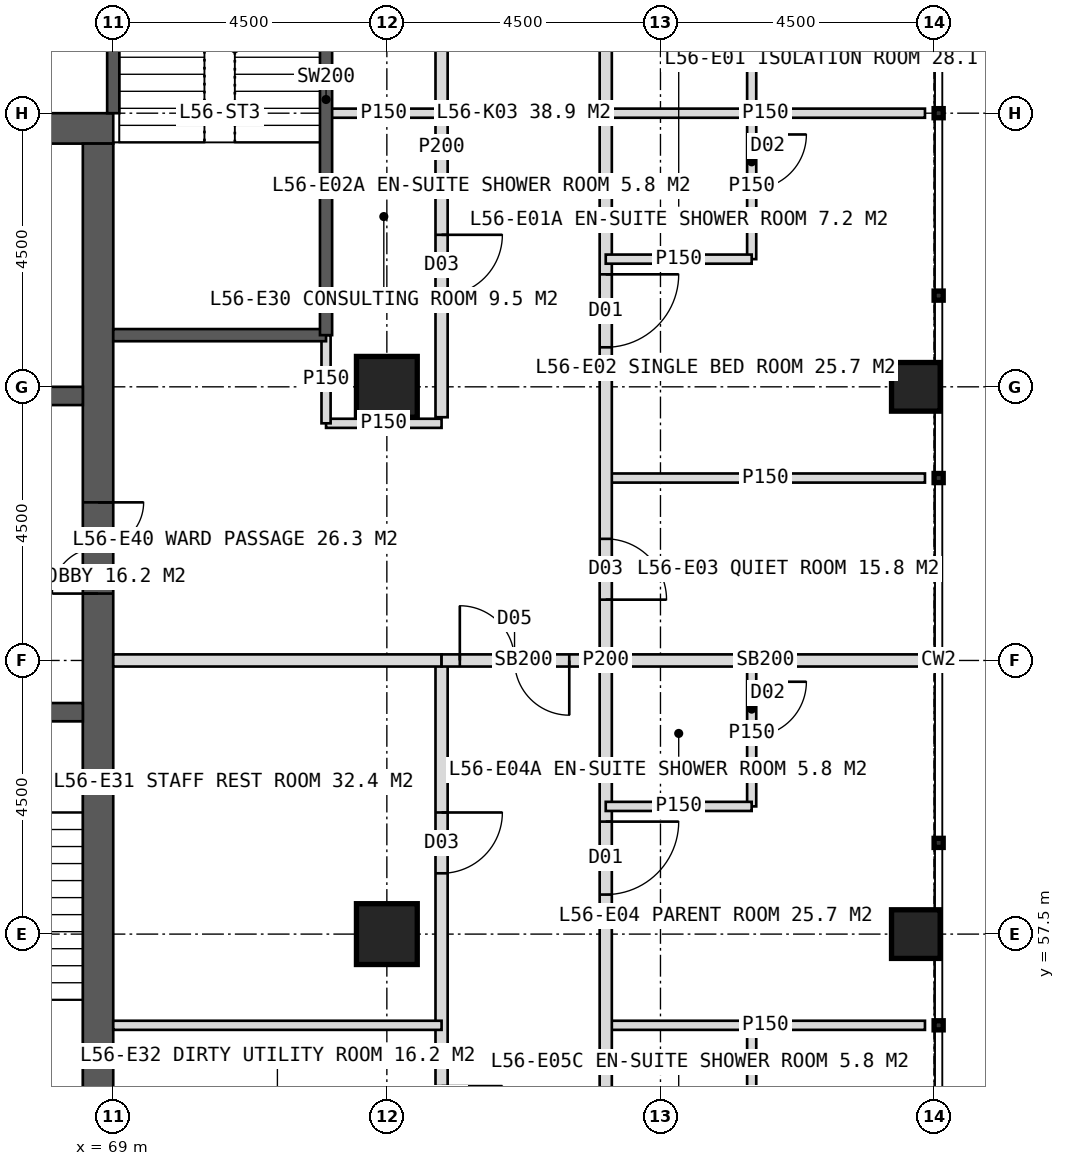
"""IFC4 building model, lengths in metres.
Left out: names, types, materials, properties, quantities, classifications, styles, units other than length and angle.
Written with IfcOpenShell. Run it as: python <this file> out.ifc"""

import sys

from ifc_helpers import new_model, si_unit, direction, frame, frame_2d, origin, origin_2d, place, context, subcontext, project, spatial, rectangle, hollow_rectangle, extrude, element, fill, save


model = new_model("IFC4")
c1 = context("Model", 3, precision=1e-05, world=origin(), true_north=direction((0.0, 1.0)))
c2 = subcontext(c1, "Body", "Model", "MODEL_VIEW")
j1 = project(units=[si_unit("LENGTHUNIT", "METRE"), si_unit("PLANEANGLEUNIT", "RADIAN")], contexts=[c1])
p1 = place(None, origin())
s1 = spatial("IfcSite", under=j1, at=p1, CompositionType="ELEMENT")
p2 = place(p1, origin())
s2 = spatial("IfcBuilding", under=s1, at=p2, CompositionType="ELEMENT")
p3 = place(p2, frame((0.0, 0.0, 233.0)))
s3 = spatial("IfcBuildingStorey", under=s2, at=p3, CompositionType="ELEMENT", Elevation=233.0)
p4 = place(p3, frame((51.0, 70.75, 0.0), z_axis=(0.0, 0.0, 1.0), x_axis=(1.0, 0.0, 0.0)))
e1 = element("IfcWall", 1, at=p4, inside=s3, PredefinedType="SHEAR", context=c2, shape_type="SweptSolid", body=[
    extrude(rectangle(XDim=18.0, YDim=0.5, at=frame_2d((9.0, 0.0))), origin(), (0.0, 0.0, 1.0), 4.0),
])
p5 = place(p4, frame((8.1, 0.0, 0.0)))
e2 = element("IfcOpeningElement", 2, at=p5, cuts=e1, PredefinedType="OPENING", context=c2, shape_type="SweptSolid", body=[
    extrude(rectangle(XDim=1.8, YDim=2.2, at=frame_2d((0.9, 1.1))), frame((0.0, 0.26, 0.0), z_axis=(0.0, -1.0, 0.0), x_axis=(1.0, 0.0, 0.0)), (0.0, 0.0, 1.0), 0.52),
])
p6 = place(p3, frame((68.75, 53.5, 0.0), z_axis=(0.0, 0.0, 1.0), x_axis=(0.0, 1.0, 0.0)))
e3 = element("IfcWall", 3, at=p6, inside=s3, PredefinedType="SHEAR", context=c2, shape_type="SweptSolid", body=[
    extrude(rectangle(XDim=17.0, YDim=0.5, at=frame_2d((8.5, 0.0))), origin(), (0.0, 0.0, 1.0), 4.0),
])
p7 = place(p6, frame((9.6, 0.0, 0.0)))
e4 = element("IfcOpeningElement", 4, at=p7, cuts=e3, PredefinedType="OPENING", context=c2, shape_type="SweptSolid", body=[
    extrude(rectangle(XDim=1.5, YDim=2.2, at=frame_2d((0.75, 1.1))), frame((0.0, 0.26, 0.0), z_axis=(0.0, -1.0, 0.0), x_axis=(1.0, 0.0, 0.0)), (0.0, 0.0, 1.0), 0.52),
])
p8 = place(p3, frame((65.2, 61.15, 0.0), z_axis=(0.0, 0.0, 1.0), x_axis=(1.0, 0.0, 0.0)))
e5 = element("IfcWall", 5, at=p8, inside=s3, PredefinedType="SHEAR", context=c2, shape_type="SweptSolid", body=[
    extrude(rectangle(XDim=3.3, YDim=0.3, at=frame_2d((1.65, 0.0))), origin(), (0.0, 0.0, 1.0), 4.0),
])
p9 = place(p8, frame((1.05, 0.0, 0.0)))
e6 = element("IfcOpeningElement", 6, at=p9, cuts=e5, PredefinedType="OPENING", context=c2, shape_type="SweptSolid", body=[
    extrude(rectangle(XDim=1.2, YDim=2.1, at=frame_2d((0.6, 1.05))), frame((0.0, 0.16, 0.0), z_axis=(0.0, -1.0, 0.0), x_axis=(1.0, 0.0, 0.0)), (0.0, 0.0, 1.0), 0.32),
])
p10 = place(p3, frame((65.2, 66.35, 0.0), z_axis=(0.0, 0.0, 1.0), x_axis=(1.0, 0.0, 0.0)))
e7 = element("IfcWall", 7, at=p10, inside=s3, PredefinedType="SHEAR", context=c2, shape_type="SweptSolid", body=[
    extrude(rectangle(XDim=3.3, YDim=0.3, at=frame_2d((1.65, 0.0))), origin(), (0.0, 0.0, 1.0), 4.0),
])
p11 = place(p10, frame((1.05, 0.0, 0.0)))
e8 = element("IfcOpeningElement", 8, at=p11, cuts=e7, PredefinedType="OPENING", context=c2, shape_type="SweptSolid", body=[
    extrude(rectangle(XDim=1.2, YDim=2.2, at=frame_2d((0.6, 1.1))), frame((0.0, 0.16, 0.0), z_axis=(0.0, -1.0, 0.0), x_axis=(1.0, 0.0, 0.0)), (0.0, 0.0, 1.0), 0.32),
])
for number, where, z_axis, x_axis in (
    (9, (73.5, 57.5, 0.0), (0.0, 0.0, 1.0), (1.0, 0.0, 0.0)),
    (10, (73.5, 66.5, 0.0), (0.0, 0.0, 1.0), (1.0, 0.0, 0.0)),
):
    element("IfcColumn", number, at=place(p3, frame(where, z_axis=z_axis, x_axis=x_axis)), inside=s3, PredefinedType="COLUMN", context=c2, shape_type="SweptSolid", body=[
        extrude(hollow_rectangle(XDim=1.0, YDim=1.0, WallThickness=0.1, at=origin_2d()), origin(), (0.0, 0.0, 1.0), 4.0),
    ])
for number, where, z_axis, x_axis in (
    (11, (82.2, 57.5, 0.0), (0.0, 0.0, 1.0), (1.0, 0.0, 0.0)),
    (12, (82.2, 66.5, 0.0), (0.0, 0.0, 1.0), (1.0, 0.0, 0.0)),
):
    element("IfcColumn", number, at=place(p3, frame(where, z_axis=z_axis, x_axis=x_axis)), inside=s3, PredefinedType="COLUMN", context=c2, shape_type="SweptSolid", body=[
        extrude(hollow_rectangle(XDim=0.8, YDim=0.8, WallThickness=0.08, at=origin_2d()), origin(), (0.0, 0.0, 1.0), 4.0),
    ])
for number, where, z_axis, x_axis in (
    (13, (77.1, 71.0, 0.0), (0.0, 0.0, 1.0), (1.0, 0.0, 0.0)),
    (14, (77.1, 65.0, 0.0), (0.0, 0.0, 1.0), (1.0, 0.0, 0.0)),
):
    element("IfcWall", number, at=place(p3, frame(where, z_axis=z_axis, x_axis=x_axis)), inside=s3, PredefinedType="PARTITIONING", context=c2, shape_type="SweptSolid", body=[
        extrude(rectangle(XDim=5.25, YDim=0.15, at=frame_2d((2.625, 0.0))), origin(), (0.0, 0.0, 1.0), 3.75),
    ])
p12 = place(p3, frame((77.1, 62.0, 0.0), z_axis=(0.0, 0.0, 1.0), x_axis=(1.0, 0.0, 0.0)))
e15 = element("IfcWall", 15, at=p12, inside=s3, PredefinedType="SOLIDWALL", context=c2, shape_type="SweptSolid", body=[
    extrude(rectangle(XDim=5.25, YDim=0.2, at=frame_2d((2.625, 0.0))), origin(), (0.0, 0.0, 1.0), 2.95),
])
p13 = place(p3, frame((77.1, 56.0, 0.0), z_axis=(0.0, 0.0, 1.0), x_axis=(1.0, 0.0, 0.0)))
e16 = element("IfcWall", 16, at=p13, inside=s3, PredefinedType="PARTITIONING", context=c2, shape_type="SweptSolid", body=[
    extrude(rectangle(XDim=5.25, YDim=0.15, at=frame_2d((2.625, 0.0))), origin(), (0.0, 0.0, 1.0), 3.75),
])
p14 = place(p3, frame((77.1, 79.1, 0.0), z_axis=(0.0, 0.0, 1.0), x_axis=(0.0, -1.0, 0.0)))
e17 = element("IfcWall", 17, at=p14, inside=s3, PredefinedType="PARTITIONING", context=c2, shape_type="SweptSolid", body=[
    extrude(rectangle(XDim=34.2, YDim=0.2, at=frame_2d((17.1, 0.0))), origin(), (0.0, 0.0, 1.0), 3.75),
])
p15 = place(p14, frame((3.65, 0.0, 0.0)))
e18 = element("IfcOpeningElement", 18, at=p15, cuts=e17, PredefinedType="OPENING", context=c2, shape_type="SweptSolid", body=[
    extrude(rectangle(XDim=1.2, YDim=2.2, at=frame_2d((0.6, 1.1))), frame((0.0, 0.11, 0.0), z_axis=(0.0, -1.0, 0.0), x_axis=(1.0, 0.0, 0.0)), (0.0, 0.0, 1.0), 0.22),
])
p16 = place(p14, frame((10.75, 0.0, 0.0)))
e19 = element("IfcOpeningElement", 19, at=p16, cuts=e17, PredefinedType="OPENING", context=c2, shape_type="SweptSolid", body=[
    extrude(rectangle(XDim=1.2, YDim=2.2, at=frame_2d((0.6, 1.1))), frame((0.0, 0.11, 0.0), z_axis=(0.0, -1.0, 0.0), x_axis=(1.0, 0.0, 0.0)), (0.0, 0.0, 1.0), 0.22),
])
p17 = place(p14, frame((15.1, 0.0, 0.0)))
e20 = element("IfcOpeningElement", 20, at=p17, cuts=e17, PredefinedType="OPENING", context=c2, shape_type="SweptSolid", body=[
    extrude(rectangle(XDim=1.0, YDim=2.1, at=frame_2d((0.5, 1.05))), frame((0.0, 0.11, 0.0), z_axis=(0.0, -1.0, 0.0), x_axis=(1.0, 0.0, 0.0)), (0.0, 0.0, 1.0), 0.22),
])
p18 = place(p14, frame((19.75, 0.0, 0.0)))
e21 = element("IfcOpeningElement", 21, at=p18, cuts=e17, PredefinedType="OPENING", context=c2, shape_type="SweptSolid", body=[
    extrude(rectangle(XDim=1.2, YDim=2.2, at=frame_2d((0.6, 1.1))), frame((0.0, 0.11, 0.0), z_axis=(0.0, -1.0, 0.0), x_axis=(1.0, 0.0, 0.0)), (0.0, 0.0, 1.0), 0.22),
])
p19 = place(p14, frame((30.35, 0.0, 0.0)))
e22 = element("IfcOpeningElement", 22, at=p19, cuts=e17, PredefinedType="OPENING", context=c2, shape_type="SweptSolid", body=[
    extrude(rectangle(XDim=1.2, YDim=2.2, at=frame_2d((0.6, 1.1))), frame((0.0, 0.11, 0.0), z_axis=(0.0, -1.0, 0.0), x_axis=(1.0, 0.0, 0.0)), (0.0, 0.0, 1.0), 0.22),
])
p20 = place(p3, frame((79.5, 74.0, 0.0), z_axis=(0.0, 0.0, 1.0), x_axis=(0.0, -1.0, 0.0)))
e23 = element("IfcWall", 23, at=p20, inside=s3, PredefinedType="PARTITIONING", context=c2, shape_type="SweptSolid", body=[
    extrude(rectangle(XDim=3.0, YDim=0.15, at=frame_2d((1.5, 0.0))), origin(), (0.0, 0.0, 1.0), 3.75),
])
p21 = place(p20, frame((0.35, 0.0, 0.0)))
e24 = element("IfcOpeningElement", 24, at=p21, cuts=e23, PredefinedType="OPENING", context=c2, shape_type="SweptSolid", body=[
    extrude(rectangle(XDim=0.9, YDim=2.1, at=frame_2d((0.45, 1.05))), frame((0.0, 0.085, 0.0), z_axis=(0.0, -1.0, 0.0), x_axis=(1.0, 0.0, 0.0)), (0.0, 0.0, 1.0), 0.17),
])
p22 = place(p3, frame((79.5, 71.0, 0.0), z_axis=(0.0, 0.0, 1.0), x_axis=(0.0, -1.0, 0.0)))
e25 = element("IfcWall", 25, at=p22, inside=s3, PredefinedType="PARTITIONING", context=c2, shape_type="SweptSolid", body=[
    extrude(rectangle(XDim=2.4, YDim=0.15, at=frame_2d((1.2, 0.0))), origin(), (0.0, 0.0, 1.0), 3.75),
])
p23 = place(p22, frame((0.35, 0.0, 0.0)))
e26 = element("IfcOpeningElement", 26, at=p23, cuts=e25, PredefinedType="OPENING", context=c2, shape_type="SweptSolid", body=[
    extrude(rectangle(XDim=0.9, YDim=2.1, at=frame_2d((0.45, 1.05))), frame((0.0, 0.085, 0.0), z_axis=(0.0, -1.0, 0.0), x_axis=(1.0, 0.0, 0.0)), (0.0, 0.0, 1.0), 0.17),
])
p24 = place(p3, frame((77.1, 68.6, 0.0), z_axis=(0.0, 0.0, 1.0), x_axis=(1.0, 0.0, 0.0)))
e27 = element("IfcWall", 27, at=p24, inside=s3, PredefinedType="PARTITIONING", context=c2, shape_type="SweptSolid", body=[
    extrude(rectangle(XDim=2.4, YDim=0.15, at=frame_2d((1.2, 0.0))), origin(), (0.0, 0.0, 1.0), 3.75),
])
p25 = place(p3, frame((79.5, 62.0, 0.0), z_axis=(0.0, 0.0, 1.0), x_axis=(0.0, -1.0, 0.0)))
e28 = element("IfcWall", 28, at=p25, inside=s3, PredefinedType="PARTITIONING", context=c2, shape_type="SweptSolid", body=[
    extrude(rectangle(XDim=2.4, YDim=0.15, at=frame_2d((1.2, 0.0))), origin(), (0.0, 0.0, 1.0), 3.75),
])
p26 = place(p25, frame((0.35, 0.0, 0.0)))
e29 = element("IfcOpeningElement", 29, at=p26, cuts=e28, PredefinedType="OPENING", context=c2, shape_type="SweptSolid", body=[
    extrude(rectangle(XDim=0.9, YDim=2.1, at=frame_2d((0.45, 1.05))), frame((0.0, 0.085, 0.0), z_axis=(0.0, -1.0, 0.0), x_axis=(1.0, 0.0, 0.0)), (0.0, 0.0, 1.0), 0.17),
])
p27 = place(p3, frame((77.1, 59.6, 0.0), z_axis=(0.0, 0.0, 1.0), x_axis=(1.0, 0.0, 0.0)))
e30 = element("IfcWall", 30, at=p27, inside=s3, PredefinedType="PARTITIONING", context=c2, shape_type="SweptSolid", body=[
    extrude(rectangle(XDim=2.4, YDim=0.15, at=frame_2d((1.2, 0.0))), origin(), (0.0, 0.0, 1.0), 3.75),
])
p28 = place(p3, frame((79.5, 56.0, 0.0), z_axis=(0.0, 0.0, 1.0), x_axis=(0.0, -1.0, 0.0)))
e31 = element("IfcWall", 31, at=p28, inside=s3, PredefinedType="PARTITIONING", context=c2, shape_type="SweptSolid", body=[
    extrude(rectangle(XDim=2.4, YDim=0.15, at=frame_2d((1.2, 0.0))), origin(), (0.0, 0.0, 1.0), 3.75),
])
p29 = place(p28, frame((1.15, 0.0, 0.0)))
e32 = element("IfcOpeningElement", 32, at=p29, cuts=e31, PredefinedType="OPENING", context=c2, shape_type="SweptSolid", body=[
    extrude(rectangle(XDim=0.9, YDim=2.1, at=frame_2d((0.45, 1.05))), frame((0.0, 0.085, 0.0), z_axis=(0.0, -1.0, 0.0), x_axis=(1.0, 0.0, 0.0)), (0.0, 0.0, 1.0), 0.17),
])
p30 = place(p3, frame((72.5, 71.0, 0.0), z_axis=(0.0, 0.0, 1.0), x_axis=(1.0, 0.0, 0.0)))
e33 = element("IfcWall", 33, at=p30, inside=s3, PredefinedType="PARTITIONING", context=c2, shape_type="SweptSolid", body=[
    extrude(rectangle(XDim=1.9, YDim=0.15, at=frame_2d((0.95, 0.0))), origin(), (0.0, 0.0, 1.0), 3.75),
])
p31 = place(p3, frame((74.4, 74.9, 0.0), z_axis=(0.0, 0.0, 1.0), x_axis=(0.0, -1.0, 0.0)))
e34 = element("IfcWall", 34, at=p31, inside=s3, PredefinedType="PARTITIONING", context=c2, shape_type="SweptSolid", body=[
    extrude(rectangle(XDim=8.9, YDim=0.2, at=frame_2d((4.45, 0.0))), origin(), (0.0, 0.0, 1.0), 3.75),
])
p32 = place(p31, frame((0.25, 0.0, 0.0)))
e35 = element("IfcOpeningElement", 35, at=p32, cuts=e34, PredefinedType="OPENING", context=c2, shape_type="SweptSolid", body=[
    extrude(rectangle(XDim=1.0, YDim=2.1, at=frame_2d((0.5, 1.05))), frame((0.0, 0.11, 0.0), z_axis=(0.0, -1.0, 0.0), x_axis=(1.0, 0.0, 0.0)), (0.0, 0.0, 1.0), 0.22),
])
p33 = place(p31, frame((5.9, 0.0, 0.0)))
e36 = element("IfcOpeningElement", 36, at=p33, cuts=e34, PredefinedType="OPENING", context=c2, shape_type="SweptSolid", body=[
    extrude(rectangle(XDim=1.0, YDim=2.1, at=frame_2d((0.5, 1.05))), frame((0.0, 0.11, 0.0), z_axis=(0.0, -1.0, 0.0), x_axis=(1.0, 0.0, 0.0)), (0.0, 0.0, 1.0), 0.22),
])
p34 = place(p3, frame((74.4, 62.0, 0.0), z_axis=(0.0, 0.0, 1.0), x_axis=(0.0, -1.0, 0.0)))
e37 = element("IfcWall", 37, at=p34, inside=s3, PredefinedType="PARTITIONING", context=c2, shape_type="SweptSolid", body=[
    extrude(rectangle(XDim=14.4, YDim=0.2, at=frame_2d((7.2, 0.0))), origin(), (0.0, 0.0, 1.0), 3.75),
])
p35 = place(p34, frame((2.5, 0.0, 0.0)))
e38 = element("IfcOpeningElement", 38, at=p35, cuts=e37, PredefinedType="OPENING", context=c2, shape_type="SweptSolid", body=[
    extrude(rectangle(XDim=1.0, YDim=2.1, at=frame_2d((0.5, 1.05))), frame((0.0, 0.11, 0.0), z_axis=(0.0, -1.0, 0.0), x_axis=(1.0, 0.0, 0.0)), (0.0, 0.0, 1.0), 0.22),
])
p36 = place(p34, frame((7.0, 0.0, 0.0)))
e39 = element("IfcOpeningElement", 39, at=p36, cuts=e37, PredefinedType="OPENING", context=c2, shape_type="SweptSolid", body=[
    extrude(rectangle(XDim=1.0, YDim=2.1, at=frame_2d((0.5, 1.05))), frame((0.0, 0.11, 0.0), z_axis=(0.0, -1.0, 0.0), x_axis=(1.0, 0.0, 0.0)), (0.0, 0.0, 1.0), 0.22),
])
p37 = place(p34, frame((11.2, 0.0, 0.0)))
e40 = element("IfcOpeningElement", 40, at=p37, cuts=e37, PredefinedType="OPENING", context=c2, shape_type="SweptSolid", body=[
    extrude(rectangle(XDim=1.0, YDim=2.1, at=frame_2d((0.5, 1.05))), frame((0.0, 0.11, 0.0), z_axis=(0.0, -1.0, 0.0), x_axis=(1.0, 0.0, 0.0)), (0.0, 0.0, 1.0), 0.22),
])
p38 = place(p3, frame((72.5, 65.9, 0.0), z_axis=(0.0, 0.0, 1.0), x_axis=(1.0, 0.0, 0.0)))
e41 = element("IfcWall", 41, at=p38, inside=s3, PredefinedType="PARTITIONING", context=c2, shape_type="SweptSolid", body=[
    extrude(rectangle(XDim=1.9, YDim=0.15, at=frame_2d((0.95, 0.0))), origin(), (0.0, 0.0, 1.0), 3.75),
])
p39 = place(p3, frame((69.0, 62.0, 0.0), z_axis=(0.0, 0.0, 1.0), x_axis=(1.0, 0.0, 0.0)))
e42 = element("IfcWall", 42, at=p39, inside=s3, PredefinedType="SOLIDWALL", context=c2, shape_type="SweptSolid", body=[
    extrude(rectangle(XDim=5.4, YDim=0.2, at=frame_2d((2.7, 0.0))), origin(), (0.0, 0.0, 1.0), 2.95),
])
p40 = place(p3, frame((69.0, 56.0, 0.0), z_axis=(0.0, 0.0, 1.0), x_axis=(1.0, 0.0, 0.0)))
e43 = element("IfcWall", 43, at=p40, inside=s3, PredefinedType="PARTITIONING", context=c2, shape_type="SweptSolid", body=[
    extrude(rectangle(XDim=5.4, YDim=0.15, at=frame_2d((2.7, 0.0))), origin(), (0.0, 0.0, 1.0), 3.75),
])
p41 = place(p3, frame((74.4, 62.0, 0.0), z_axis=(0.0, 0.0, 1.0), x_axis=(1.0, 0.0, 0.0)))
e44 = element("IfcWall", 44, at=p41, inside=s3, PredefinedType="SOLIDWALL", context=c2, shape_type="SweptSolid", body=[
    extrude(rectangle(XDim=2.7, YDim=0.2, at=frame_2d((1.35, 0.0))), origin(), (0.0, 0.0, 1.0), 2.95),
])
p42 = place(p41, frame((0.3, 0.0, 0.0)))
e45 = element("IfcOpeningElement", 45, at=p42, cuts=e44, PredefinedType="OPENING", context=c2, shape_type="SweptSolid", body=[
    extrude(rectangle(XDim=1.8, YDim=2.2, at=frame_2d((0.9, 1.1))), frame((0.0, 0.11, 0.0), z_axis=(0.0, -1.0, 0.0), x_axis=(1.0, 0.0, 0.0)), (0.0, 0.0, 1.0), 0.22),
])
p43 = place(p3, frame((72.5, 65.9, 0.0), z_axis=(0.0, 0.0, 1.0), x_axis=(0.0, 1.0, 0.0)))
e46 = element("IfcWall", 46, at=p43, inside=s3, PredefinedType="PARTITIONING", context=c2, shape_type="SweptSolid", body=[
    extrude(rectangle(XDim=1.45, YDim=0.15, at=frame_2d((0.725, 0.0))), origin(), (0.0, 0.0, 1.0), 3.75),
])
p44 = place(p3, frame((69.0, 71.0, 0.0), z_axis=(0.0, 0.0, 1.0), x_axis=(0.0, 1.0, 0.0)))
e47 = element("IfcWall", 47, at=p44, inside=s3, PredefinedType="SOLIDWALL", context=c2, shape_type="SweptSolid", body=[
    extrude(rectangle(XDim=4.1, YDim=0.2, at=frame_2d((2.05, 0.0))), origin(), (0.0, 0.0, 1.0), 3.75),
])
p45 = place(p3, frame((69.0, 67.35, 0.0), z_axis=(0.0, 0.0, 1.0), x_axis=(1.0, 0.0, 0.0)))
e48 = element("IfcWall", 48, at=p45, inside=s3, PredefinedType="SOLIDWALL", context=c2, shape_type="SweptSolid", body=[
    extrude(rectangle(XDim=3.5, YDim=0.2, at=frame_2d((1.75, 0.0))), origin(), (0.0, 0.0, 1.0), 3.75),
])
p46 = place(p3, frame((72.5, 67.35, 0.0), z_axis=(0.0, 0.0, 1.0), x_axis=(0.0, 1.0, 0.0)))
e49 = element("IfcWall", 49, at=p46, inside=s3, PredefinedType="SOLIDWALL", context=c2, shape_type="SweptSolid", body=[
    extrude(rectangle(XDim=7.75, YDim=0.2, at=frame_2d((3.875, 0.0))), origin(), (0.0, 0.0, 1.0), 3.75),
])
p47 = place(p16, origin())
e50 = element("IfcDoor", 50, at=p47, inside=s3, OperationType="SINGLE_SWING_LEFT", PredefinedType="DOOR", context=c2, shape_type="SweptSolid", body=[
    extrude(rectangle(XDim=1.2, YDim=2.2, at=frame_2d((0.6, 1.1))), frame((0.0, 0.025, 0.0), z_axis=(0.0, -1.0, 0.0), x_axis=(1.0, 0.0, 0.0)), (0.0, 0.0, 1.0), 0.05),
])
fill(e19, e50)
p48 = place(p23, origin())
e51 = element("IfcDoor", 51, at=p48, inside=s3, OperationType="SINGLE_SWING_LEFT", PredefinedType="DOOR", context=c2, shape_type="SweptSolid", body=[
    extrude(rectangle(XDim=0.9, YDim=2.1, at=frame_2d((0.45, 1.05))), frame((0.0, 0.025, 0.0), z_axis=(0.0, -1.0, 0.0), x_axis=(1.0, 0.0, 0.0)), (0.0, 0.0, 1.0), 0.05),
])
fill(e26, e51)
p49 = place(p17, origin())
e52 = element("IfcDoor", 52, at=p49, inside=s3, OperationType="SINGLE_SWING_RIGHT", PredefinedType="DOOR", context=c2, shape_type="SweptSolid", body=[
    extrude(rectangle(XDim=1.0, YDim=2.1, at=frame_2d((0.5, 1.05))), frame((0.0, 0.025, 0.0), z_axis=(0.0, -1.0, 0.0), x_axis=(1.0, 0.0, 0.0)), (0.0, 0.0, 1.0), 0.05),
])
fill(e20, e52)
p50 = place(p18, origin())
e53 = element("IfcDoor", 53, at=p50, inside=s3, OperationType="SINGLE_SWING_LEFT", PredefinedType="DOOR", context=c2, shape_type="SweptSolid", body=[
    extrude(rectangle(XDim=1.2, YDim=2.2, at=frame_2d((0.6, 1.1))), frame((0.0, 0.025, 0.0), z_axis=(0.0, -1.0, 0.0), x_axis=(1.0, 0.0, 0.0)), (0.0, 0.0, 1.0), 0.05),
])
fill(e21, e53)
p51 = place(p26, origin())
e54 = element("IfcDoor", 54, at=p51, inside=s3, OperationType="SINGLE_SWING_LEFT", PredefinedType="DOOR", context=c2, shape_type="SweptSolid", body=[
    extrude(rectangle(XDim=0.9, YDim=2.1, at=frame_2d((0.45, 1.05))), frame((0.0, 0.025, 0.0), z_axis=(0.0, -1.0, 0.0), x_axis=(1.0, 0.0, 0.0)), (0.0, 0.0, 1.0), 0.05),
])
fill(e29, e54)
p52 = place(p33, origin())
e55 = element("IfcDoor", 55, at=p52, inside=s3, OperationType="SINGLE_SWING_LEFT", PredefinedType="DOOR", context=c2, shape_type="SweptSolid", body=[
    extrude(rectangle(XDim=1.0, YDim=2.1, at=frame_2d((0.5, 1.05))), frame((0.0, 0.025, 0.0), z_axis=(0.0, -1.0, 0.0), x_axis=(1.0, 0.0, 0.0)), (0.0, 0.0, 1.0), 0.05),
])
fill(e36, e55)
p53 = place(p35, origin())
e56 = element("IfcDoor", 56, at=p53, inside=s3, OperationType="SINGLE_SWING_LEFT", PredefinedType="DOOR", context=c2, shape_type="SweptSolid", body=[
    extrude(rectangle(XDim=1.0, YDim=2.1, at=frame_2d((0.5, 1.05))), frame((0.0, 0.025, 0.0), z_axis=(0.0, -1.0, 0.0), x_axis=(1.0, 0.0, 0.0)), (0.0, 0.0, 1.0), 0.05),
])
fill(e38, e56)
p54 = place(p42, origin())
e57 = element("IfcDoor", 57, at=p54, inside=s3, OperationType="DOUBLE_DOOR_DOUBLE_SWING", PredefinedType="DOOR", context=c2, shape_type="SweptSolid", body=[
    extrude(rectangle(XDim=1.8, YDim=2.2, at=frame_2d((0.9, 1.1))), frame((0.0, 0.025, 0.0), z_axis=(0.0, -1.0, 0.0), x_axis=(1.0, 0.0, 0.0)), (0.0, 0.0, 1.0), 0.05),
])
fill(e45, e57)
p55 = place(p7, origin())
e58 = element("IfcDoor", 58, at=p55, inside=s3, OperationType="DOUBLE_DOOR_SINGLE_SWING", PredefinedType="DOOR", context=c2, shape_type="SweptSolid", body=[
    extrude(rectangle(XDim=1.5, YDim=2.2, at=frame_2d((0.75, 1.1))), frame((0.0, 0.025, 0.0), z_axis=(0.0, -1.0, 0.0), x_axis=(1.0, 0.0, 0.0)), (0.0, 0.0, 1.0), 0.05),
])
fill(e4, e58)
save(model, sys.argv[1])
